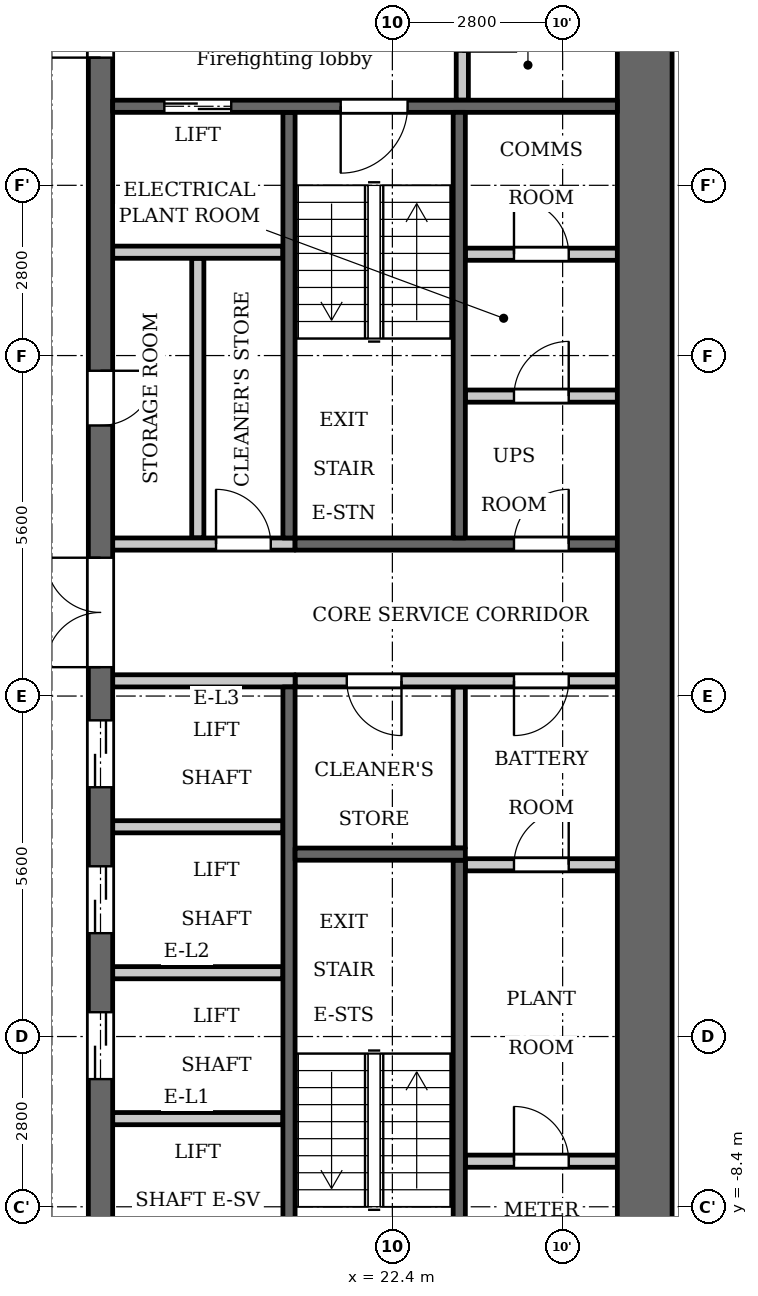
"""IFC4 building model, lengths in metres.
Left out: names, types, materials, properties, quantities, classifications, styles, units other than length and angle.
Written with IfcOpenShell. Run it as: python <this file> out.ifc"""

import sys

from ifc_helpers import new_model, si_unit, direction, frame, frame_2d, origin, place, context, subcontext, project, spatial, rectangle, extrude, element, fill, save


model = new_model("IFC4")
c1 = context("Model", 3, precision=1e-05, world=origin(), true_north=direction((0.0, 1.0)))
c2 = subcontext(c1, "Body", "Model", "MODEL_VIEW")
j1 = project(units=[si_unit("LENGTHUNIT", "METRE"), si_unit("PLANEANGLEUNIT", "RADIAN")], contexts=[c1])
p1 = place(None, origin())
s1 = spatial("IfcSite", under=j1, at=p1, CompositionType="ELEMENT")
p2 = place(p1, origin())
s2 = spatial("IfcBuilding", under=s1, at=p2, CompositionType="ELEMENT")
p3 = place(p2, frame((0.0, 0.0, 86.8)))
s3 = spatial("IfcBuildingStorey", under=s2, at=p3, CompositionType="ELEMENT", Elevation=86.8)
p4 = place(p3, frame((23.5, -2.5, 0.0), z_axis=(0.0, 0.0, 1.0), x_axis=(0.0, 1.0, 0.0)))
e1 = element("IfcWall", 1, at=p4, inside=s3, PredefinedType="PARTITIONING", context=c2, shape_type="SweptSolid", body=[
    extrude(rectangle(XDim=2.65, YDim=0.2, at=frame_2d((1.325, 0.0))), origin(), (0.0, 0.0, 1.0), 3.2),
])
p5 = place(p3, frame((20.7, 2.6, 0.0), z_axis=(0.0, 0.0, 1.0), x_axis=(0.0, 1.0, 0.0)))
e2 = element("IfcWall", 2, at=p5, inside=s3, PredefinedType="SHEAR", context=c2, shape_type="SweptSolid", body=[
    extrude(rectangle(XDim=7.0, YDim=0.2, at=frame_2d((3.5, 0.0))), origin(), (0.0, 0.0, 1.0), 3.2),
])
p6 = place(p3, frame((20.7, -9.6, 0.0), z_axis=(0.0, 0.0, 1.0), x_axis=(0.0, 1.0, 0.0)))
e3 = element("IfcWall", 3, at=p6, inside=s3, PredefinedType="SHEAR", context=c2, shape_type="SweptSolid", body=[
    extrude(rectangle(XDim=9.75, YDim=0.2, at=frame_2d((4.875, 0.0))), origin(), (0.0, 0.0, 1.0), 3.2),
])
p7 = place(p3, frame((20.8, 2.5, 0.0), z_axis=(0.0, 0.0, 1.0), x_axis=(1.0, 0.0, 0.0)))
e4 = element("IfcWall", 4, at=p7, inside=s3, PredefinedType="SHEAR", context=c2, shape_type="SweptSolid", body=[
    extrude(rectangle(XDim=5.3, YDim=0.2, at=frame_2d((2.65, 0.0))), origin(), (0.0, 0.0, 1.0), 3.2),
])
p8 = place(p7, frame((3.6, 0.0, 0.0)))
e5 = element("IfcOpeningElement", 5, at=p8, cuts=e4, PredefinedType="OPENING", context=c2, shape_type="SweptSolid", body=[
    extrude(rectangle(XDim=0.9, YDim=2.1, at=frame_2d((0.45, 1.05))), frame((0.0, 0.11, 0.0), z_axis=(0.0, -1.0, 0.0), x_axis=(1.0, 0.0, 0.0)), (0.0, 0.0, 1.0), 0.22),
])
p9 = place(p3, frame((20.8, 0.25, 0.0), z_axis=(0.0, 0.0, 1.0), x_axis=(1.0, 0.0, 0.0)))
e6 = element("IfcWall", 6, at=p9, inside=s3, PredefinedType="PARTITIONING", context=c2, shape_type="SweptSolid", body=[
    extrude(rectangle(XDim=5.3, YDim=0.2, at=frame_2d((2.65, 0.0))), origin(), (0.0, 0.0, 1.0), 3.2),
])
p10 = place(p9, frame((0.85, 0.0, 0.0)))
e7 = element("IfcOpeningElement", 7, at=p10, cuts=e6, PredefinedType="OPENING", context=c2, shape_type="SweptSolid", body=[
    extrude(rectangle(XDim=0.9, YDim=2.1, at=frame_2d((0.45, 1.05))), frame((0.0, 0.11, 0.0), z_axis=(0.0, -1.0, 0.0), x_axis=(1.0, 0.0, 0.0)), (0.0, 0.0, 1.0), 0.22),
])
p11 = place(p9, frame((3.6, 0.0, 0.0)))
e8 = element("IfcOpeningElement", 8, at=p11, cuts=e6, PredefinedType="OPENING", context=c2, shape_type="SweptSolid", body=[
    extrude(rectangle(XDim=0.9, YDim=2.1, at=frame_2d((0.45, 1.05))), frame((0.0, 0.11, 0.0), z_axis=(0.0, -1.0, 0.0), x_axis=(1.0, 0.0, 0.0)), (0.0, 0.0, 1.0), 0.22),
])
p12 = place(p3, frame((19.2, 2.6, 0.0), z_axis=(0.0, 0.0, 1.0), x_axis=(0.0, 1.0, 0.0)))
e9 = element("IfcWall", 9, at=p12, inside=s3, PredefinedType="PARTITIONING", context=c2, shape_type="SweptSolid", body=[
    extrude(rectangle(XDim=4.6, YDim=0.2, at=frame_2d((2.3, 0.0))), origin(), (0.0, 0.0, 1.0), 3.2),
])
p13 = place(p3, frame((17.6, -12.3, 0.0), z_axis=(0.0, 0.0, 1.0), x_axis=(0.0, 1.0, 0.0)))
e10 = element("IfcWall", 10, at=p13, inside=s3, PredefinedType="SHEAR", context=c2, shape_type="SweptSolid", body=[
    extrude(rectangle(XDim=24.6, YDim=0.4, at=frame_2d((12.3, 0.0))), origin(), (0.0, 0.0, 1.0), 3.2),
])
p14 = place(p13, frame((6.0, 0.0, 0.0)))
e11 = element("IfcOpeningElement", 11, at=p14, cuts=e10, PredefinedType="OPENING", context=c2, shape_type="SweptSolid", body=[
    extrude(rectangle(XDim=1.1, YDim=2.1, at=frame_2d((0.55, 1.05))), frame((0.0, 0.21, 0.0), z_axis=(0.0, -1.0, 0.0), x_axis=(1.0, 0.0, 0.0)), (0.0, 0.0, 1.0), 0.42),
])
p15 = place(p13, frame((8.4, 0.0, 0.0)))
e12 = element("IfcOpeningElement", 12, at=p15, cuts=e10, PredefinedType="OPENING", context=c2, shape_type="SweptSolid", body=[
    extrude(rectangle(XDim=1.1, YDim=2.1, at=frame_2d((0.55, 1.05))), frame((0.0, 0.21, 0.0), z_axis=(0.0, -1.0, 0.0), x_axis=(1.0, 0.0, 0.0)), (0.0, 0.0, 1.0), 0.42),
])
p16 = place(p13, frame((10.8, 0.0, 0.0)))
e13 = element("IfcOpeningElement", 13, at=p16, cuts=e10, PredefinedType="OPENING", context=c2, shape_type="SweptSolid", body=[
    extrude(rectangle(XDim=1.1, YDim=2.1, at=frame_2d((0.55, 1.05))), frame((0.0, 0.21, 0.0), z_axis=(0.0, -1.0, 0.0), x_axis=(1.0, 0.0, 0.0)), (0.0, 0.0, 1.0), 0.42),
])
p17 = place(p13, frame((16.75, 0.0, 0.0)))
e14 = element("IfcOpeningElement", 14, at=p17, cuts=e10, PredefinedType="OPENING", context=c2, shape_type="SweptSolid", body=[
    extrude(rectangle(XDim=0.9, YDim=2.1, at=frame_2d((0.45, 1.05))), frame((0.0, 0.21, 0.0), z_axis=(0.0, -1.0, 0.0), x_axis=(1.0, 0.0, 0.0)), (0.0, 0.0, 1.0), 0.42),
])
p18 = place(p13, frame((22.8, 0.0, 0.0)))
e15 = element("IfcOpeningElement", 15, at=p18, cuts=e10, PredefinedType="OPENING", context=c2, shape_type="SweptSolid", body=[
    extrude(rectangle(XDim=1.1, YDim=2.1, at=frame_2d((0.55, 1.05))), frame((0.0, 0.21, 0.0), z_axis=(0.0, -1.0, 0.0), x_axis=(1.0, 0.0, 0.0)), (0.0, 0.0, 1.0), 0.42),
])
p19 = place(p13, frame((0.7, 0.0, 0.0)))
e16 = element("IfcOpeningElement", 16, at=p19, cuts=e10, PredefinedType="OPENING", context=c2, shape_type="SweptSolid", body=[
    extrude(rectangle(XDim=1.1, YDim=2.1, at=frame_2d((0.55, 1.05))), frame((0.0, 0.21, 0.0), z_axis=(0.0, -1.0, 0.0), x_axis=(1.0, 0.0, 0.0)), (0.0, 0.0, 1.0), 0.42),
])
p20 = place(p13, frame((12.775, 0.0, 0.0)))
e17 = element("IfcOpeningElement", 17, at=p20, cuts=e10, PredefinedType="OPENING", context=c2, shape_type="SweptSolid", body=[
    extrude(rectangle(XDim=1.8, YDim=2.1, at=frame_2d((0.9, 1.05))), frame((0.0, 0.21, 0.0), z_axis=(0.0, -1.0, 0.0), x_axis=(1.0, 0.0, 0.0)), (0.0, 0.0, 1.0), 0.42),
])
p21 = place(p3, frame((26.55, -12.3, 0.0), z_axis=(0.0, 0.0, 1.0), x_axis=(0.0, 1.0, 0.0)))
e18 = element("IfcWall", 18, at=p21, inside=s3, PredefinedType="SHEAR", context=c2, shape_type="SweptSolid", body=[
    extrude(rectangle(XDim=24.6, YDim=0.9, at=frame_2d((12.3, 0.0))), origin(), (0.0, 0.0, 1.0), 3.2),
])
p22 = place(p3, frame((23.55, 9.8, 0.0), z_axis=(0.0, 0.0, 1.0), x_axis=(0.0, 1.0, 0.0)))
e19 = element("IfcWall", 19, at=p22, inside=s3, PredefinedType="PARTITIONING", context=c2, shape_type="SweptSolid", body=[
    extrude(rectangle(XDim=2.5, YDim=0.2, at=frame_2d((1.25, 0.0))), origin(), (0.0, 0.0, 1.0), 3.2),
])
p23 = place(p22, frame((0.8, 0.0, 0.0)))
e20 = element("IfcOpeningElement", 20, at=p23, cuts=e19, PredefinedType="OPENING", context=c2, shape_type="SweptSolid", body=[
    extrude(rectangle(XDim=0.9, YDim=2.1, at=frame_2d((0.45, 1.05))), frame((0.0, 0.11, 0.0), z_axis=(0.0, -1.0, 0.0), x_axis=(1.0, 0.0, 0.0)), (0.0, 0.0, 1.0), 0.22),
])
p24 = place(p3, frame((23.6, -7.65, 0.0), z_axis=(0.0, 0.0, 1.0), x_axis=(1.0, 0.0, 0.0)))
e21 = element("IfcWall", 21, at=p24, inside=s3, PredefinedType="PARTITIONING", context=c2, shape_type="SweptSolid", body=[
    extrude(rectangle(XDim=2.5, YDim=0.2, at=frame_2d((1.25, 0.0))), origin(), (0.0, 0.0, 1.0), 3.2),
])
p25 = place(p24, frame((0.8, 0.0, 0.0)))
e22 = element("IfcOpeningElement", 22, at=p25, cuts=e21, PredefinedType="OPENING", context=c2, shape_type="SweptSolid", body=[
    extrude(rectangle(XDim=0.9, YDim=2.1, at=frame_2d((0.45, 1.05))), frame((0.0, 0.11, 0.0), z_axis=(0.0, -1.0, 0.0), x_axis=(1.0, 0.0, 0.0)), (0.0, 0.0, 1.0), 0.22),
])
p26 = place(p3, frame((23.6, -2.775, 0.0), z_axis=(0.0, 0.0, 1.0), x_axis=(1.0, 0.0, 0.0)))
e23 = element("IfcWall", 23, at=p26, inside=s3, PredefinedType="PARTITIONING", context=c2, shape_type="SweptSolid", body=[
    extrude(rectangle(XDim=2.5, YDim=0.2, at=frame_2d((1.25, 0.0))), origin(), (0.0, 0.0, 1.0), 3.2),
])
p27 = place(p26, frame((0.8, 0.0, 0.0)))
e24 = element("IfcOpeningElement", 24, at=p27, cuts=e23, PredefinedType="OPENING", context=c2, shape_type="SweptSolid", body=[
    extrude(rectangle(XDim=0.9, YDim=2.1, at=frame_2d((0.45, 1.05))), frame((0.0, 0.11, 0.0), z_axis=(0.0, -1.0, 0.0), x_axis=(1.0, 0.0, 0.0)), (0.0, 0.0, 1.0), 0.22),
])
p28 = place(p3, frame((23.6, 4.933, 0.0), z_axis=(0.0, 0.0, 1.0), x_axis=(1.0, 0.0, 0.0)))
e25 = element("IfcWall", 25, at=p28, inside=s3, PredefinedType="PARTITIONING", context=c2, shape_type="SweptSolid", body=[
    extrude(rectangle(XDim=2.5, YDim=0.2, at=frame_2d((1.25, 0.0))), origin(), (0.0, 0.0, 1.0), 3.2),
])
p29 = place(p28, frame((0.8, 0.0, 0.0)))
e26 = element("IfcOpeningElement", 26, at=p29, cuts=e25, PredefinedType="OPENING", context=c2, shape_type="SweptSolid", body=[
    extrude(rectangle(XDim=0.9, YDim=2.1, at=frame_2d((0.45, 1.05))), frame((0.0, 0.11, 0.0), z_axis=(0.0, -1.0, 0.0), x_axis=(1.0, 0.0, 0.0)), (0.0, 0.0, 1.0), 0.22),
])
p30 = place(p3, frame((23.6, 7.267, 0.0), z_axis=(0.0, 0.0, 1.0), x_axis=(1.0, 0.0, 0.0)))
e27 = element("IfcWall", 27, at=p30, inside=s3, PredefinedType="PARTITIONING", context=c2, shape_type="SweptSolid", body=[
    extrude(rectangle(XDim=2.5, YDim=0.2, at=frame_2d((1.25, 0.0))), origin(), (0.0, 0.0, 1.0), 3.2),
])
p31 = place(p30, frame((0.8, 0.0, 0.0)))
e28 = element("IfcOpeningElement", 28, at=p31, cuts=e27, PredefinedType="OPENING", context=c2, shape_type="SweptSolid", body=[
    extrude(rectangle(XDim=0.9, YDim=2.1, at=frame_2d((0.45, 1.05))), frame((0.0, 0.11, 0.0), z_axis=(0.0, -1.0, 0.0), x_axis=(1.0, 0.0, 0.0)), (0.0, 0.0, 1.0), 0.22),
])
for number, where, z_axis, x_axis in (
    (29, (17.8, -6.95, 0.0), (0.0, 0.0, 1.0), (1.0, 0.0, 0.0)),
    (30, (17.8, -4.55, 0.0), (0.0, 0.0, 1.0), (1.0, 0.0, 0.0)),
    (31, (17.8, -2.15, 0.0), (0.0, 0.0, 1.0), (1.0, 0.0, 0.0)),
):
    element("IfcWall", number, at=place(p3, frame(where, z_axis=z_axis, x_axis=x_axis)), inside=s3, PredefinedType="PARTITIONING", context=c2, shape_type="SweptSolid", body=[
        extrude(rectangle(XDim=2.8, YDim=0.2, at=frame_2d((1.4, 0.0))), origin(), (0.0, 0.0, 1.0), 3.2),
    ])
p32 = place(p3, frame((17.8, 0.25, 0.0), z_axis=(0.0, 0.0, 1.0), x_axis=(1.0, 0.0, 0.0)))
e32 = element("IfcWall", 32, at=p32, inside=s3, PredefinedType="PARTITIONING", context=c2, shape_type="SweptSolid", body=[
    extrude(rectangle(XDim=3.0, YDim=0.2, at=frame_2d((1.5, 0.0))), origin(), (0.0, 0.0, 1.0), 3.2),
])
p33 = place(p3, frame((17.8, 2.5, 0.0), z_axis=(0.0, 0.0, 1.0), x_axis=(1.0, 0.0, 0.0)))
e33 = element("IfcWall", 33, at=p33, inside=s3, PredefinedType="PARTITIONING", context=c2, shape_type="SweptSolid", body=[
    extrude(rectangle(XDim=3.0, YDim=0.2, at=frame_2d((1.5, 0.0))), origin(), (0.0, 0.0, 1.0), 3.2),
])
p34 = place(p33, frame((1.7, 0.0, 0.0)))
e34 = element("IfcOpeningElement", 34, at=p34, cuts=e33, PredefinedType="OPENING", context=c2, shape_type="SweptSolid", body=[
    extrude(rectangle(XDim=0.9, YDim=2.1, at=frame_2d((0.45, 1.05))), frame((0.0, 0.11, 0.0), z_axis=(0.0, -1.0, 0.0), x_axis=(1.0, 0.0, 0.0)), (0.0, 0.0, 1.0), 0.22),
])
p35 = place(p3, frame((17.8, 7.3, 0.0), z_axis=(0.0, 0.0, 1.0), x_axis=(1.0, 0.0, 0.0)))
e35 = element("IfcWall", 35, at=p35, inside=s3, PredefinedType="PARTITIONING", context=c2, shape_type="SweptSolid", body=[
    extrude(rectangle(XDim=2.8, YDim=0.2, at=frame_2d((1.4, 0.0))), origin(), (0.0, 0.0, 1.0), 3.2),
])
p36 = place(p3, frame((17.8, 9.7, 0.0), z_axis=(0.0, 0.0, 1.0), x_axis=(1.0, 0.0, 0.0)))
e36 = element("IfcWall", 36, at=p36, inside=s3, PredefinedType="SHEAR", context=c2, shape_type="SweptSolid", body=[
    extrude(rectangle(XDim=8.3, YDim=0.2, at=frame_2d((4.15, 0.0))), origin(), (0.0, 0.0, 1.0), 3.2),
])
p37 = place(p36, frame((0.85, 0.0, 0.0)))
e37 = element("IfcOpeningElement", 37, at=p37, cuts=e36, PredefinedType="OPENING", context=c2, shape_type="SweptSolid", body=[
    extrude(rectangle(XDim=1.1, YDim=2.1, at=frame_2d((0.55, 1.05))), frame((0.0, 0.11, 0.0), z_axis=(0.0, -1.0, 0.0), x_axis=(1.0, 0.0, 0.0)), (0.0, 0.0, 1.0), 0.22),
])
p38 = place(p36, frame((3.75, 0.0, 0.0)))
e38 = element("IfcOpeningElement", 38, at=p38, cuts=e36, PredefinedType="OPENING", context=c2, shape_type="SweptSolid", body=[
    extrude(rectangle(XDim=1.1, YDim=2.1, at=frame_2d((0.55, 1.05))), frame((0.0, 0.11, 0.0), z_axis=(0.0, -1.0, 0.0), x_axis=(1.0, 0.0, 0.0)), (0.0, 0.0, 1.0), 0.22),
])
p39 = place(p3, frame((23.5, 2.6, 0.0), z_axis=(0.0, 0.0, 1.0), x_axis=(0.0, 1.0, 0.0)))
e39 = element("IfcWall", 39, at=p39, inside=s3, PredefinedType="SHEAR", context=c2, shape_type="SweptSolid", body=[
    extrude(rectangle(XDim=7.0, YDim=0.2, at=frame_2d((3.5, 0.0))), origin(), (0.0, 0.0, 1.0), 3.2),
])
p40 = place(p3, frame((23.5, -9.6, 0.0), z_axis=(0.0, 0.0, 1.0), x_axis=(0.0, 1.0, 0.0)))
e40 = element("IfcWall", 40, at=p40, inside=s3, PredefinedType="SHEAR", context=c2, shape_type="SweptSolid", body=[
    extrude(rectangle(XDim=6.9, YDim=0.2, at=frame_2d((3.45, 0.0))), origin(), (0.0, 0.0, 1.0), 3.2),
])
p41 = place(p3, frame((20.8, -2.6, 0.0), z_axis=(0.0, 0.0, 1.0), x_axis=(1.0, 0.0, 0.0)))
e41 = element("IfcWall", 41, at=p41, inside=s3, PredefinedType="SHEAR", context=c2, shape_type="SweptSolid", body=[
    extrude(rectangle(XDim=2.8, YDim=0.2, at=frame_2d((1.4, 0.0))), origin(), (0.0, 0.0, 1.0), 3.2),
])
p42 = place(p14, origin())
e42 = element("IfcDoor", 42, at=p42, inside=s3, OperationType="DOUBLE_DOOR_SLIDING", PredefinedType="DOOR", context=c2, shape_type="SweptSolid", body=[
    extrude(rectangle(XDim=1.1, YDim=2.1, at=frame_2d((0.55, 1.05))), frame((0.0, 0.025, 0.0), z_axis=(0.0, -1.0, 0.0), x_axis=(1.0, 0.0, 0.0)), (0.0, 0.0, 1.0), 0.05),
])
fill(e11, e42)
p43 = place(p15, origin())
e43 = element("IfcDoor", 43, at=p43, inside=s3, OperationType="DOUBLE_DOOR_SLIDING", PredefinedType="DOOR", context=c2, shape_type="SweptSolid", body=[
    extrude(rectangle(XDim=1.1, YDim=2.1, at=frame_2d((0.55, 1.05))), frame((0.0, 0.025, 0.0), z_axis=(0.0, -1.0, 0.0), x_axis=(1.0, 0.0, 0.0)), (0.0, 0.0, 1.0), 0.05),
])
fill(e12, e43)
p44 = place(p16, origin())
e44 = element("IfcDoor", 44, at=p44, inside=s3, OperationType="DOUBLE_DOOR_SLIDING", PredefinedType="DOOR", context=c2, shape_type="SweptSolid", body=[
    extrude(rectangle(XDim=1.1, YDim=2.1, at=frame_2d((0.55, 1.05))), frame((0.0, 0.025, 0.0), z_axis=(0.0, -1.0, 0.0), x_axis=(1.0, 0.0, 0.0)), (0.0, 0.0, 1.0), 0.05),
])
fill(e13, e44)
p45 = place(p17, origin())
e45 = element("IfcDoor", 45, at=p45, inside=s3, OperationType="SINGLE_SWING_RIGHT", PredefinedType="DOOR", context=c2, shape_type="SweptSolid", body=[
    extrude(rectangle(XDim=0.9, YDim=2.1, at=frame_2d((0.45, 1.05))), frame((0.0, 0.025, 0.0), z_axis=(0.0, -1.0, 0.0), x_axis=(1.0, 0.0, 0.0)), (0.0, 0.0, 1.0), 0.05),
])
fill(e14, e45)
p46 = place(p34, origin())
e46 = element("IfcDoor", 46, at=p46, inside=s3, OperationType="SINGLE_SWING_RIGHT", PredefinedType="DOOR", context=c2, shape_type="SweptSolid", body=[
    extrude(rectangle(XDim=0.9, YDim=2.1, at=frame_2d((0.45, 1.05))), frame((0.0, 0.025, 0.0), z_axis=(0.0, -1.0, 0.0), x_axis=(1.0, 0.0, 0.0)), (0.0, 0.0, 1.0), 0.05),
])
fill(e34, e46)
p47 = place(p37, origin())
e47 = element("IfcDoor", 47, at=p47, inside=s3, OperationType="DOUBLE_DOOR_SLIDING", PredefinedType="DOOR", context=c2, shape_type="SweptSolid", body=[
    extrude(rectangle(XDim=1.1, YDim=2.1, at=frame_2d((0.55, 1.05))), frame((0.0, 0.025, 0.0), z_axis=(0.0, -1.0, 0.0), x_axis=(1.0, 0.0, 0.0)), (0.0, 0.0, 1.0), 0.05),
])
fill(e37, e47)
p48 = place(p18, origin())
e48 = element("IfcDoor", 48, at=p48, inside=s3, OperationType="SINGLE_SWING_RIGHT", PredefinedType="DOOR", context=c2, shape_type="SweptSolid", body=[
    extrude(rectangle(XDim=1.1, YDim=2.1, at=frame_2d((0.55, 1.05))), frame((0.0, 0.025, 0.0), z_axis=(0.0, -1.0, 0.0), x_axis=(1.0, 0.0, 0.0)), (0.0, 0.0, 1.0), 0.05),
])
fill(e15, e48)
p49 = place(p38, origin())
e49 = element("IfcDoor", 49, at=p49, inside=s3, OperationType="SINGLE_SWING_LEFT", PredefinedType="DOOR", context=c2, shape_type="SweptSolid", body=[
    extrude(rectangle(XDim=1.1, YDim=2.1, at=frame_2d((0.55, 1.05))), frame((0.0, 0.025, 0.0), z_axis=(0.0, -1.0, 0.0), x_axis=(1.0, 0.0, 0.0)), (0.0, 0.0, 1.0), 0.05),
])
fill(e38, e49)
p50 = place(p20, origin())
e50 = element("IfcDoor", 50, at=p50, inside=s3, OperationType="DOUBLE_DOOR_SINGLE_SWING", PredefinedType="DOOR", context=c2, shape_type="SweptSolid", body=[
    extrude(rectangle(XDim=1.8, YDim=2.1, at=frame_2d((0.9, 1.05))), frame((0.0, 0.025, 0.0), z_axis=(0.0, -1.0, 0.0), x_axis=(1.0, 0.0, 0.0)), (0.0, 0.0, 1.0), 0.05),
])
fill(e17, e50)
p51 = place(p10, origin())
e51 = element("IfcDoor", 51, at=p51, inside=s3, OperationType="SINGLE_SWING_RIGHT", PredefinedType="DOOR", context=c2, shape_type="SweptSolid", body=[
    extrude(rectangle(XDim=0.9, YDim=2.1, at=frame_2d((0.45, 1.05))), frame((0.0, 0.025, 0.0), z_axis=(0.0, -1.0, 0.0), x_axis=(1.0, 0.0, 0.0)), (0.0, 0.0, 1.0), 0.05),
])
fill(e7, e51)
p52 = place(p25, origin())
e52 = element("IfcDoor", 52, at=p52, inside=s3, OperationType="SINGLE_SWING_RIGHT", PredefinedType="DOOR", context=c2, shape_type="SweptSolid", body=[
    extrude(rectangle(XDim=0.9, YDim=2.1, at=frame_2d((0.45, 1.05))), frame((0.0, 0.025, 0.0), z_axis=(0.0, -1.0, 0.0), x_axis=(1.0, 0.0, 0.0)), (0.0, 0.0, 1.0), 0.05),
])
fill(e22, e52)
p53 = place(p27, origin())
e53 = element("IfcDoor", 53, at=p53, inside=s3, OperationType="SINGLE_SWING_LEFT", PredefinedType="DOOR", context=c2, shape_type="SweptSolid", body=[
    extrude(rectangle(XDim=0.9, YDim=2.1, at=frame_2d((0.45, 1.05))), frame((0.0, 0.025, 0.0), z_axis=(0.0, -1.0, 0.0), x_axis=(1.0, 0.0, 0.0)), (0.0, 0.0, 1.0), 0.05),
])
fill(e24, e53)
p54 = place(p11, origin())
e54 = element("IfcDoor", 54, at=p54, inside=s3, OperationType="SINGLE_SWING_LEFT", PredefinedType="DOOR", context=c2, shape_type="SweptSolid", body=[
    extrude(rectangle(XDim=0.9, YDim=2.1, at=frame_2d((0.45, 1.05))), frame((0.0, 0.025, 0.0), z_axis=(0.0, -1.0, 0.0), x_axis=(1.0, 0.0, 0.0)), (0.0, 0.0, 1.0), 0.05),
])
fill(e8, e54)
p55 = place(p29, origin())
e55 = element("IfcDoor", 55, at=p55, inside=s3, OperationType="SINGLE_SWING_LEFT", PredefinedType="DOOR", context=c2, shape_type="SweptSolid", body=[
    extrude(rectangle(XDim=0.9, YDim=2.1, at=frame_2d((0.45, 1.05))), frame((0.0, 0.025, 0.0), z_axis=(0.0, -1.0, 0.0), x_axis=(1.0, 0.0, 0.0)), (0.0, 0.0, 1.0), 0.05),
])
fill(e26, e55)
p56 = place(p31, origin())
e56 = element("IfcDoor", 56, at=p56, inside=s3, OperationType="SINGLE_SWING_RIGHT", PredefinedType="DOOR", context=c2, shape_type="SweptSolid", body=[
    extrude(rectangle(XDim=0.9, YDim=2.1, at=frame_2d((0.45, 1.05))), frame((0.0, 0.025, 0.0), z_axis=(0.0, -1.0, 0.0), x_axis=(1.0, 0.0, 0.0)), (0.0, 0.0, 1.0), 0.05),
])
fill(e28, e56)
p57 = place(p8, origin())
e57 = element("IfcDoor", 57, at=p57, inside=s3, OperationType="SINGLE_SWING_LEFT", PredefinedType="DOOR", context=c2, shape_type="SweptSolid", body=[
    extrude(rectangle(XDim=0.9, YDim=2.1, at=frame_2d((0.45, 1.05))), frame((0.0, 0.025, 0.0), z_axis=(0.0, -1.0, 0.0), x_axis=(1.0, 0.0, 0.0)), (0.0, 0.0, 1.0), 0.05),
])
fill(e5, e57)
save(model, sys.argv[1])
